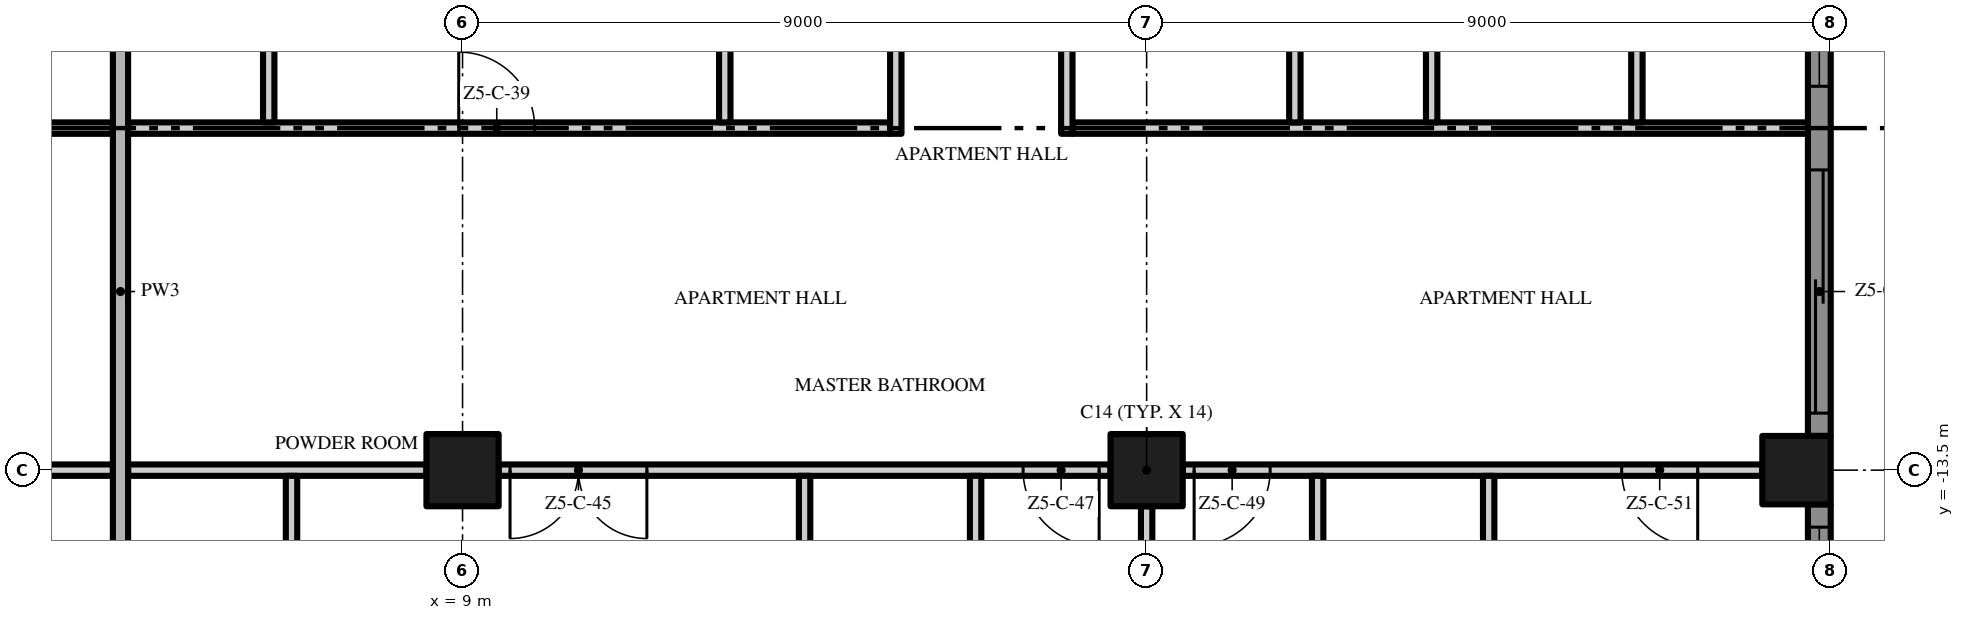
"""IFC4 building model, lengths in metres.
Left out: names, types, materials, properties, quantities, classifications, styles, units other than length and angle.
Written with IfcOpenShell. Run it as: python <this file> out.ifc"""

import sys

from ifc_helpers import new_model, si_unit, direction, frame, frame_2d, origin, origin_2d, place, context, subcontext, project, spatial, polyline, rectangle, outline, extrude, element, fill, save


model = new_model("IFC4")
c1 = context("Model", 3, precision=1e-05, world=origin(), true_north=direction((0.0, 1.0)))
c2 = subcontext(c1, "Body", "Model", "MODEL_VIEW")
j1 = project(units=[si_unit("LENGTHUNIT", "METRE"), si_unit("PLANEANGLEUNIT", "RADIAN")], contexts=[c1])
p1 = place(None, origin())
s1 = spatial("IfcSite", under=j1, at=p1, CompositionType="ELEMENT")
p2 = place(p1, origin())
s2 = spatial("IfcBuilding", under=s1, at=p2, CompositionType="ELEMENT")
p3 = place(p2, frame((0.0, 0.0, 265.4)))
s3 = spatial("IfcBuildingStorey", under=s2, at=p3, CompositionType="ELEMENT", Elevation=265.4)
p4 = place(p3, frame((18.0, -13.5, 0.0), z_axis=(0.0, 0.0, 1.0), x_axis=(1.0, 0.0, 0.0)))
e1 = element("IfcColumn", 1, at=p4, inside=s3, PredefinedType="COLUMN", context=c2, shape_type="SweptSolid", body=[
    extrude(rectangle(XDim=0.95, YDim=0.95, at=origin_2d()), origin(), (0.0, 0.0, 1.0), 3.5),
])
p5 = place(p3, frame((26.55, -13.5, 0.0), z_axis=(0.0, 0.0, 1.0), x_axis=(1.0, 0.0, 0.0)))
e2 = element("IfcColumn", 2, at=p5, inside=s3, PredefinedType="COLUMN", context=c2, shape_type="SweptSolid", body=[
    extrude(rectangle(XDim=0.9, YDim=0.9, at=origin_2d()), origin(), (0.0, 0.0, 1.0), 3.5),
])
p6 = place(p3, frame((9.0, -13.5, 0.0), z_axis=(0.0, 0.0, 1.0), x_axis=(1.0, 0.0, 0.0)))
e3 = element("IfcColumn", 3, at=p6, inside=s3, PredefinedType="COLUMN", context=c2, shape_type="SweptSolid", body=[
    extrude(rectangle(XDim=0.95, YDim=0.95, at=origin_2d()), origin(), (0.0, 0.0, 1.0), 3.5),
])
p7 = place(p3, frame((26.85, -13.95, 0.0), z_axis=(0.0, 0.0, 1.0), x_axis=(0.0, -1.0, 0.0)))
e4 = element("IfcWall", 4, at=p7, inside=s3, PredefinedType="SOLIDWALL", context=c2, shape_type="SweptSolid", body=[
    extrude(rectangle(XDim=3.75, YDim=0.3, at=frame_2d((1.875, 0.0))), origin(), (0.0, 0.0, 1.0), 3.5),
])
p8 = place(p7, frame((0.3, 0.0, 0.45)))
e5 = element("IfcOpeningElement", 5, at=p8, cuts=e4, PredefinedType="OPENING", context=c2, shape_type="SweptSolid", body=[
    extrude(rectangle(XDim=3.15, YDim=2.65, at=frame_2d((1.575, 1.325))), frame((0.0, 0.16, 0.0), z_axis=(0.0, -1.0, 0.0), x_axis=(1.0, 0.0, 0.0)), (0.0, 0.0, 1.0), 0.32),
])
p9 = place(p3, frame((26.85, -4.95, 0.0), z_axis=(0.0, 0.0, 1.0), x_axis=(0.0, -1.0, 0.0)))
e6 = element("IfcWall", 6, at=p9, inside=s3, PredefinedType="SOLIDWALL", context=c2, shape_type="SweptSolid", body=[
    extrude(rectangle(XDim=8.1, YDim=0.3, at=frame_2d((4.05, 0.0))), origin(), (0.0, 0.0, 1.0), 3.5),
])
p10 = place(p9, frame((4.6, 0.0, 0.0)))
e7 = element("IfcOpeningElement", 7, at=p10, cuts=e6, PredefinedType="OPENING", context=c2, shape_type="SweptSolid", body=[
    extrude(rectangle(XDim=3.2, YDim=2.4, at=frame_2d((1.6, 1.2))), frame((0.0, 0.16, 0.0), z_axis=(0.0, -1.0, 0.0), x_axis=(1.0, 0.0, 0.0)), (0.0, 0.0, 1.0), 0.32),
])
p11 = place(p9, frame((0.3, 0.0, 0.45)))
e8 = element("IfcOpeningElement", 8, at=p11, cuts=e6, PredefinedType="OPENING", context=c2, shape_type="SweptSolid", body=[
    extrude(rectangle(XDim=3.2, YDim=2.65, at=frame_2d((1.6, 1.325))), frame((0.0, 0.16, 0.0), z_axis=(0.0, -1.0, 0.0), x_axis=(1.0, 0.0, 0.0)), (0.0, 0.0, 1.0), 0.32),
])
p12 = place(p3, origin())
e9 = element("IfcWall", 9, at=p12, inside=s3, PredefinedType="USERDEFINED", context=c2, shape_type="SweptSolid", body=[
    extrude(outline(polyline([(27.6, -18.0), (27.829, -16.5), (28.429, -15.0), (29.171, -13.5), (29.771, -12.0), (30.0, -10.5), (29.771, -9.0), (29.171, -7.5), (28.429, -6.0), (27.829, -4.5), (27.6, -3.0), (27.829, -1.5), (28.429, 0.0), (29.171, 1.5), (29.771, 3.0), (30.0, 4.5), (29.771, 6.0), (29.171, 7.5), (28.429, 9.0), (27.829, 10.5), (27.6, 12.0), (27.829, 13.5), (28.429, 15.0), (29.171, 16.5), (29.771, 18.0), (29.539, 18.093), (28.942, 16.602), (28.201, 15.102), (27.586, 13.566), (27.347, 12.0), (27.586, 10.434), (28.201, 8.898), (28.942, 7.398), (29.528, 5.934), (29.747, 4.5), (29.528, 3.066), (28.942, 1.602), (28.201, 0.102), (27.586, -1.434), (27.347, -3.0), (27.586, -4.566), (28.201, -6.102), (28.942, -7.602), (29.528, -9.066), (29.747, -10.5), (29.528, -11.934), (28.942, -13.398), (28.201, -14.898), (27.586, -16.434), (27.353, -17.962), (27.6, -18.0)])), origin(), (0.0, 0.0, 1.0), 0.9),
])
for number, where, z_axis, x_axis in (
    (10, (0.475, -13.5, 0.0), (0.0, 0.0, 1.0), (1.0, 0.0, 0.0)),
    (11, (4.6, -13.5, 0.0), (0.0, 0.0, 1.0), (1.0, 0.0, 0.0)),
):
    element("IfcWall", number, at=place(p3, frame(where, z_axis=z_axis, x_axis=x_axis)), inside=s3, PredefinedType="PARTITIONING", context=c2, shape_type="SweptSolid", body=[
        extrude(rectangle(XDim=3.925, YDim=0.15, at=frame_2d((1.962, 0.0))), origin(), (0.0, 0.0, 1.0), 3.5),
    ])
p13 = place(p3, frame((17.525, -13.5, 0.0), z_axis=(0.0, 0.0, 1.0), x_axis=(-1.0, 0.0, 0.0)))
e12 = element("IfcWall", 12, at=p13, inside=s3, PredefinedType="PARTITIONING", context=c2, shape_type="SweptSolid", body=[
    extrude(rectangle(XDim=8.05, YDim=0.15, at=frame_2d((4.025, 0.0))), origin(), (0.0, 0.0, 1.0), 3.5),
])
p14 = place(p13, frame((6.1, 0.0, 0.0)))
e13 = element("IfcOpeningElement", 13, at=p14, cuts=e12, PredefinedType="OPENING", context=c2, shape_type="SweptSolid", body=[
    extrude(rectangle(XDim=1.8, YDim=2.4, at=frame_2d((0.9, 1.2))), frame((0.0, 0.085, 0.0), z_axis=(0.0, -1.0, 0.0), x_axis=(1.0, 0.0, 0.0)), (0.0, 0.0, 1.0), 0.17),
])
p15 = place(p13, frame((0.15, 0.0, 0.0)))
e14 = element("IfcOpeningElement", 14, at=p15, cuts=e12, PredefinedType="OPENING", context=c2, shape_type="SweptSolid", body=[
    extrude(rectangle(XDim=1.0, YDim=2.4, at=frame_2d((0.5, 1.2))), frame((0.0, 0.085, 0.0), z_axis=(0.0, -1.0, 0.0), x_axis=(1.0, 0.0, 0.0)), (0.0, 0.0, 1.0), 0.17),
])
p16 = place(p3, frame((26.1, -13.5, 0.0), z_axis=(0.0, 0.0, 1.0), x_axis=(-1.0, 0.0, 0.0)))
e15 = element("IfcWall", 15, at=p16, inside=s3, PredefinedType="PARTITIONING", context=c2, shape_type="SweptSolid", body=[
    extrude(rectangle(XDim=7.625, YDim=0.15, at=frame_2d((3.812, 0.0))), origin(), (0.0, 0.0, 1.0), 3.5),
])
p17 = place(p16, frame((6.475, 0.0, 0.0)))
e16 = element("IfcOpeningElement", 16, at=p17, cuts=e15, PredefinedType="OPENING", context=c2, shape_type="SweptSolid", body=[
    extrude(rectangle(XDim=1.0, YDim=2.4, at=frame_2d((0.5, 1.2))), frame((0.0, 0.085, 0.0), z_axis=(0.0, -1.0, 0.0), x_axis=(1.0, 0.0, 0.0)), (0.0, 0.0, 1.0), 0.17),
])
p18 = place(p16, frame((0.85, 0.0, 0.0)))
e17 = element("IfcOpeningElement", 17, at=p18, cuts=e15, PredefinedType="OPENING", context=c2, shape_type="SweptSolid", body=[
    extrude(rectangle(XDim=1.0, YDim=2.4, at=frame_2d((0.5, 1.2))), frame((0.0, 0.085, 0.0), z_axis=(0.0, -1.0, 0.0), x_axis=(1.0, 0.0, 0.0)), (0.0, 0.0, 1.0), 0.17),
])
p19 = place(p3, frame((-11.625, -9.0, 0.0), z_axis=(0.0, 0.0, 1.0), x_axis=(1.0, 0.0, 0.0)))
e18 = element("IfcWall", 18, at=p19, inside=s3, PredefinedType="PARTITIONING", context=c2, shape_type="SweptSolid", body=[
    extrude(rectangle(XDim=16.025, YDim=0.15, at=frame_2d((8.012, 0.0))), origin(), (0.0, 0.0, 1.0), 3.5),
])
p20 = place(p19, frame((4.675, 0.0, 0.0)))
e19 = element("IfcOpeningElement", 19, at=p20, cuts=e18, PredefinedType="OPENING", context=c2, shape_type="SweptSolid", body=[
    extrude(rectangle(XDim=1.0, YDim=2.4, at=frame_2d((0.5, 1.2))), frame((0.0, 0.085, 0.0), z_axis=(0.0, -1.0, 0.0), x_axis=(1.0, 0.0, 0.0)), (0.0, 0.0, 1.0), 0.17),
])
p21 = place(p3, frame((4.6, -9.0, 0.0), z_axis=(0.0, 0.0, 1.0), x_axis=(1.0, 0.0, 0.0)))
e20 = element("IfcWall", 20, at=p21, inside=s3, PredefinedType="PARTITIONING", context=c2, shape_type="SweptSolid", body=[
    extrude(rectangle(XDim=10.025, YDim=0.15, at=frame_2d((5.013, 0.0))), origin(), (0.0, 0.0, 1.0), 3.5),
])
p22 = place(p21, frame((4.35, 0.0, 0.0)))
e21 = element("IfcOpeningElement", 21, at=p22, cuts=e20, PredefinedType="OPENING", context=c2, shape_type="SweptSolid", body=[
    extrude(rectangle(XDim=1.0, YDim=2.4, at=frame_2d((0.5, 1.2))), frame((0.0, 0.085, 0.0), z_axis=(0.0, -1.0, 0.0), x_axis=(1.0, 0.0, 0.0)), (0.0, 0.0, 1.0), 0.17),
])
p23 = place(p3, frame((17.025, -9.0, 0.0), z_axis=(0.0, 0.0, 1.0), x_axis=(1.0, 0.0, 0.0)))
e22 = element("IfcWall", 22, at=p23, inside=s3, PredefinedType="PARTITIONING", context=c2, shape_type="SweptSolid", body=[
    extrude(rectangle(XDim=9.675, YDim=0.15, at=frame_2d((4.838, 0.0))), origin(), (0.0, 0.0, 1.0), 3.5),
])
p24 = place(p3, frame((4.5, -22.2, 0.0), z_axis=(0.0, 0.0, 1.0), x_axis=(0.0, 1.0, 0.0)))
e23 = element("IfcWall", 23, at=p24, inside=s3, PredefinedType="PARTITIONING", context=c2, shape_type="SweptSolid", body=[
    extrude(rectangle(XDim=22.1, YDim=0.2, at=frame_2d((11.05, 0.0))), origin(), (0.0, 0.0, 1.0), 3.5),
])
p25 = place(p3, frame((6.45, -8.925, 0.0), z_axis=(0.0, 0.0, 1.0), x_axis=(0.0, 1.0, 0.0)))
e24 = element("IfcWall", 24, at=p25, inside=s3, PredefinedType="PARTITIONING", context=c2, shape_type="SweptSolid", body=[
    extrude(rectangle(XDim=4.35, YDim=0.15, at=frame_2d((2.175, 0.0))), origin(), (0.0, 0.0, 1.0), 3.5),
])
p26 = place(p3, frame((6.75, -16.575, 0.0), z_axis=(0.0, 0.0, 1.0), x_axis=(0.0, 1.0, 0.0)))
e25 = element("IfcWall", 25, at=p26, inside=s3, PredefinedType="PARTITIONING", context=c2, shape_type="SweptSolid", body=[
    extrude(rectangle(XDim=3.0, YDim=0.15, at=frame_2d((1.5, 0.0))), origin(), (0.0, 0.0, 1.0), 3.5),
])
p27 = place(p26, frame((1.125, 0.0, 0.0)))
e26 = element("IfcOpeningElement", 26, at=p27, cuts=e25, PredefinedType="OPENING", context=c2, shape_type="SweptSolid", body=[
    extrude(rectangle(XDim=0.9, YDim=2.1, at=frame_2d((0.45, 1.05))), frame((0.0, 0.085, 0.0), z_axis=(0.0, -1.0, 0.0), x_axis=(1.0, 0.0, 0.0)), (0.0, 0.0, 1.0), 0.17),
])
p28 = place(p3, frame((12.45, -8.925, 0.0), z_axis=(0.0, 0.0, 1.0), x_axis=(0.0, 1.0, 0.0)))
e27 = element("IfcWall", 27, at=p28, inside=s3, PredefinedType="PARTITIONING", context=c2, shape_type="SweptSolid", body=[
    extrude(rectangle(XDim=4.35, YDim=0.15, at=frame_2d((2.175, 0.0))), origin(), (0.0, 0.0, 1.0), 3.5),
])
p29 = place(p3, frame((13.5, -22.2, 0.0), z_axis=(0.0, 0.0, 1.0), x_axis=(0.0, 1.0, 0.0)))
e28 = element("IfcWall", 28, at=p29, inside=s3, PredefinedType="PARTITIONING", context=c2, shape_type="SweptSolid", body=[
    extrude(rectangle(XDim=8.625, YDim=0.15, at=frame_2d((4.312, 0.0))), origin(), (0.0, 0.0, 1.0), 3.5),
])
p30 = place(p3, frame((14.7, -9.075, 0.0), z_axis=(0.0, 0.0, 1.0), x_axis=(0.0, 1.0, 0.0)))
e29 = element("IfcWall", 29, at=p30, inside=s3, PredefinedType="PARTITIONING", context=c2, shape_type="SweptSolid", body=[
    extrude(rectangle(XDim=4.65, YDim=0.15, at=frame_2d((2.325, 0.0))), origin(), (0.0, 0.0, 1.0), 3.5),
])
p31 = place(p30, frame((1.875, 0.0, 0.0)))
e30 = element("IfcOpeningElement", 30, at=p31, cuts=e29, PredefinedType="OPENING", context=c2, shape_type="SweptSolid", body=[
    extrude(rectangle(XDim=0.9, YDim=2.1, at=frame_2d((0.45, 1.05))), frame((0.0, 0.085, 0.0), z_axis=(0.0, -1.0, 0.0), x_axis=(1.0, 0.0, 0.0)), (0.0, 0.0, 1.0), 0.17),
])
p32 = place(p3, frame((15.75, -16.575, 0.0), z_axis=(0.0, 0.0, 1.0), x_axis=(0.0, 1.0, 0.0)))
e31 = element("IfcWall", 31, at=p32, inside=s3, PredefinedType="PARTITIONING", context=c2, shape_type="SweptSolid", body=[
    extrude(rectangle(XDim=3.0, YDim=0.15, at=frame_2d((1.5, 0.0))), origin(), (0.0, 0.0, 1.0), 3.5),
])
p33 = place(p3, frame((16.95, -9.075, 0.0), z_axis=(0.0, 0.0, 1.0), x_axis=(0.0, 1.0, 0.0)))
e32 = element("IfcWall", 32, at=p33, inside=s3, PredefinedType="PARTITIONING", context=c2, shape_type="SweptSolid", body=[
    extrude(rectangle(XDim=4.65, YDim=0.15, at=frame_2d((2.325, 0.0))), origin(), (0.0, 0.0, 1.0), 3.5),
])
p34 = place(p3, frame((18.0, -21.6, 0.0), z_axis=(0.0, 0.0, 1.0), x_axis=(0.0, 1.0, 0.0)))
e33 = element("IfcWall", 33, at=p34, inside=s3, PredefinedType="PARTITIONING", context=c2, shape_type="SweptSolid", body=[
    extrude(rectangle(XDim=7.625, YDim=0.15, at=frame_2d((3.812, 0.0))), origin(), (0.0, 0.0, 1.0), 3.5),
])
p35 = place(p3, frame((19.95, -8.925, 0.0), z_axis=(0.0, 0.0, 1.0), x_axis=(0.0, 1.0, 0.0)))
e34 = element("IfcWall", 34, at=p35, inside=s3, PredefinedType="PARTITIONING", context=c2, shape_type="SweptSolid", body=[
    extrude(rectangle(XDim=4.35, YDim=0.15, at=frame_2d((2.175, 0.0))), origin(), (0.0, 0.0, 1.0), 3.5),
])
p36 = place(p3, frame((20.25, -16.575, 0.0), z_axis=(0.0, 0.0, 1.0), x_axis=(0.0, 1.0, 0.0)))
e35 = element("IfcWall", 35, at=p36, inside=s3, PredefinedType="PARTITIONING", context=c2, shape_type="SweptSolid", body=[
    extrude(rectangle(XDim=3.0, YDim=0.15, at=frame_2d((1.5, 0.0))), origin(), (0.0, 0.0, 1.0), 3.5),
])
p37 = place(p3, frame((21.75, -8.925, 0.0), z_axis=(0.0, 0.0, 1.0), x_axis=(0.0, 1.0, 0.0)))
e36 = element("IfcWall", 36, at=p37, inside=s3, PredefinedType="PARTITIONING", context=c2, shape_type="SweptSolid", body=[
    extrude(rectangle(XDim=4.35, YDim=0.15, at=frame_2d((2.175, 0.0))), origin(), (0.0, 0.0, 1.0), 3.5),
])
p38 = place(p3, frame((22.5, -17.55, 0.0), z_axis=(0.0, 0.0, 1.0), x_axis=(0.0, 1.0, 0.0)))
e37 = element("IfcWall", 37, at=p38, inside=s3, PredefinedType="PARTITIONING", context=c2, shape_type="SweptSolid", body=[
    extrude(rectangle(XDim=3.975, YDim=0.15, at=frame_2d((1.988, 0.0))), origin(), (0.0, 0.0, 1.0), 3.5),
])
p39 = place(p3, frame((24.45, -8.925, 0.0), z_axis=(0.0, 0.0, 1.0), x_axis=(0.0, 1.0, 0.0)))
e38 = element("IfcWall", 38, at=p39, inside=s3, PredefinedType="PARTITIONING", context=c2, shape_type="SweptSolid", body=[
    extrude(rectangle(XDim=4.35, YDim=0.15, at=frame_2d((2.175, 0.0))), origin(), (0.0, 0.0, 1.0), 3.5),
])
p40 = place(p8, origin())
e39 = element("IfcWindow", 39, at=p40, inside=s3, PartitioningType="SINGLE_PANEL", PredefinedType="WINDOW", context=c2, shape_type="SweptSolid", body=[
    extrude(rectangle(XDim=3.15, YDim=2.65, at=frame_2d((1.575, 1.325))), frame((0.0, 0.03, 0.0), z_axis=(0.0, -1.0, 0.0), x_axis=(1.0, 0.0, 0.0)), (0.0, 0.0, 1.0), 0.06),
])
fill(e5, e39)
p41 = place(p10, origin())
e40 = element("IfcDoor", 40, at=p41, inside=s3, OperationType="SINGLE_SWING_LEFT", PredefinedType="DOOR", context=c2, shape_type="SweptSolid", body=[
    extrude(rectangle(XDim=3.2, YDim=2.4, at=frame_2d((1.6, 1.2))), frame((0.0, 0.025, 0.0), z_axis=(0.0, -1.0, 0.0), x_axis=(1.0, 0.0, 0.0)), (0.0, 0.0, 1.0), 0.05),
])
fill(e7, e40)
p42 = place(p11, origin())
e41 = element("IfcWindow", 41, at=p42, inside=s3, PartitioningType="SINGLE_PANEL", PredefinedType="WINDOW", context=c2, shape_type="SweptSolid", body=[
    extrude(rectangle(XDim=3.2, YDim=2.65, at=frame_2d((1.6, 1.325))), frame((0.0, 0.03, 0.0), z_axis=(0.0, -1.0, 0.0), x_axis=(1.0, 0.0, 0.0)), (0.0, 0.0, 1.0), 0.06),
])
fill(e8, e41)
p43 = place(p22, origin())
e42 = element("IfcDoor", 42, at=p43, inside=s3, OperationType="SINGLE_SWING_LEFT", PredefinedType="DOOR", context=c2, shape_type="SweptSolid", body=[
    extrude(rectangle(XDim=1.0, YDim=2.4, at=frame_2d((0.5, 1.2))), frame((0.0, 0.025, 0.0), z_axis=(0.0, -1.0, 0.0), x_axis=(1.0, 0.0, 0.0)), (0.0, 0.0, 1.0), 0.05),
])
fill(e21, e42)
p44 = place(p14, origin())
e43 = element("IfcDoor", 43, at=p44, inside=s3, OperationType="DOUBLE_DOOR_SINGLE_SWING", PredefinedType="DOOR", context=c2, shape_type="SweptSolid", body=[
    extrude(rectangle(XDim=1.8, YDim=2.4, at=frame_2d((0.9, 1.2))), frame((0.0, 0.025, 0.0), z_axis=(0.0, -1.0, 0.0), x_axis=(1.0, 0.0, 0.0)), (0.0, 0.0, 1.0), 0.05),
])
fill(e13, e43)
p45 = place(p15, origin())
e44 = element("IfcDoor", 44, at=p45, inside=s3, OperationType="SINGLE_SWING_LEFT", PredefinedType="DOOR", context=c2, shape_type="SweptSolid", body=[
    extrude(rectangle(XDim=1.0, YDim=2.4, at=frame_2d((0.5, 1.2))), frame((0.0, 0.025, 0.0), z_axis=(0.0, -1.0, 0.0), x_axis=(1.0, 0.0, 0.0)), (0.0, 0.0, 1.0), 0.05),
])
fill(e14, e44)
p46 = place(p17, origin())
e45 = element("IfcDoor", 45, at=p46, inside=s3, OperationType="SINGLE_SWING_RIGHT", PredefinedType="DOOR", context=c2, shape_type="SweptSolid", body=[
    extrude(rectangle(XDim=1.0, YDim=2.4, at=frame_2d((0.5, 1.2))), frame((0.0, 0.025, 0.0), z_axis=(0.0, -1.0, 0.0), x_axis=(1.0, 0.0, 0.0)), (0.0, 0.0, 1.0), 0.05),
])
fill(e16, e45)
p47 = place(p18, origin())
e46 = element("IfcDoor", 46, at=p47, inside=s3, OperationType="SINGLE_SWING_LEFT", PredefinedType="DOOR", context=c2, shape_type="SweptSolid", body=[
    extrude(rectangle(XDim=1.0, YDim=2.4, at=frame_2d((0.5, 1.2))), frame((0.0, 0.025, 0.0), z_axis=(0.0, -1.0, 0.0), x_axis=(1.0, 0.0, 0.0)), (0.0, 0.0, 1.0), 0.05),
])
fill(e17, e46)
save(model, sys.argv[1])
